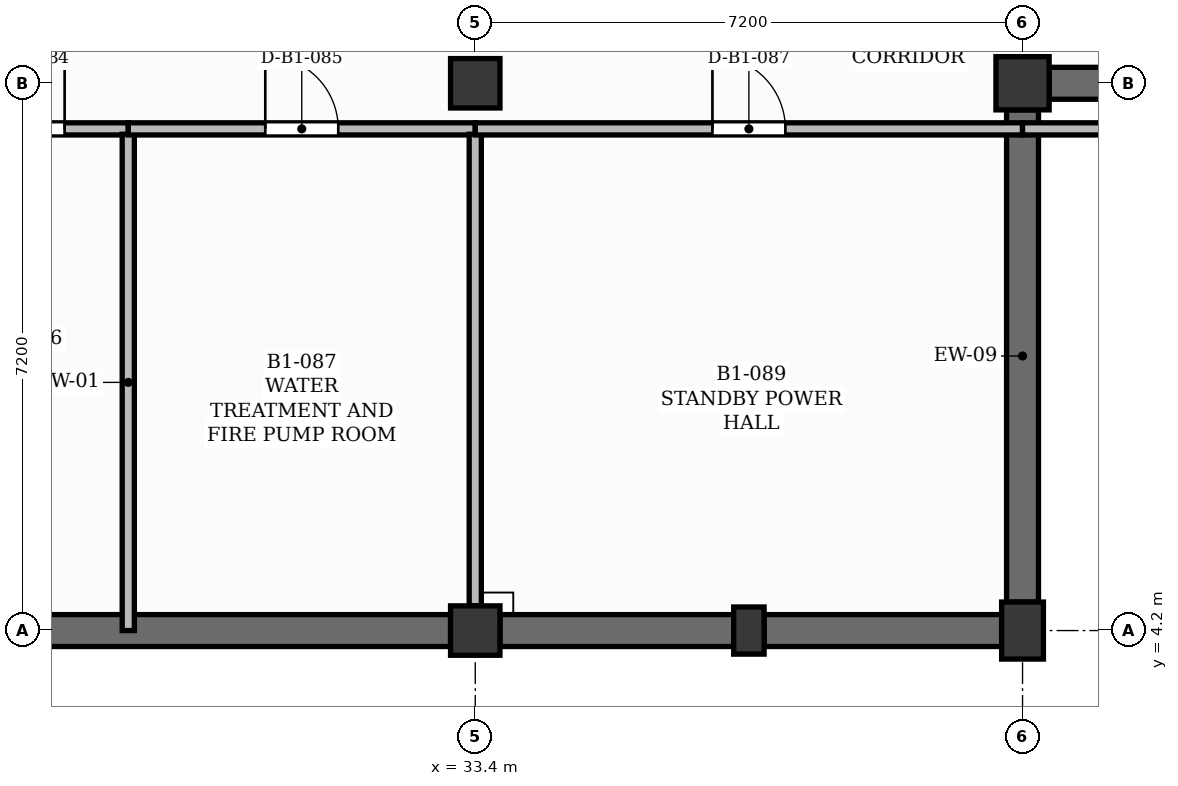
"""IFC4 building model, lengths in metres.
Left out: names, types, materials, properties, quantities, classifications, styles, units other than length and angle.
Written with IfcOpenShell. Run it as: python <this file> out.ifc"""

import sys

from ifc_helpers import new_model, si_unit, direction, frame, frame_2d, origin, origin_2d, place, context, subcontext, project, spatial, rectangle, extrude, element, fill, save


model = new_model("IFC4")
c1 = context("Model", 3, precision=1e-05, world=origin(), true_north=direction((0.0, 1.0)))
c2 = subcontext(c1, "Body", "Model", "MODEL_VIEW")
j1 = project(units=[si_unit("LENGTHUNIT", "METRE"), si_unit("PLANEANGLEUNIT", "RADIAN")], contexts=[c1])
p1 = place(None, origin())
s1 = spatial("IfcSite", under=j1, at=p1, CompositionType="ELEMENT")
p2 = place(p1, origin())
s2 = spatial("IfcBuilding", under=s1, at=p2, CompositionType="ELEMENT")
p3 = place(p2, frame((0.0, 0.0, -4.5)))
s3 = spatial("IfcBuildingStorey", under=s2, at=p3, CompositionType="ELEMENT", Elevation=-4.5)
for number, where, z_axis, x_axis in (
    (1, (33.4, 4.2, 0.0), (0.0, 0.0, 1.0), (1.0, 0.0, 0.0)),
    (2, (33.4, 11.4, 0.0), (0.0, 0.0, 1.0), (1.0, 0.0, 0.0)),
):
    element("IfcColumn", number, at=place(p3, frame(where, z_axis=z_axis, x_axis=x_axis)), inside=s3, PredefinedType="COLUMN", context=c2, shape_type="SweptSolid", body=[
        extrude(rectangle(XDim=0.65, YDim=0.65, at=origin_2d()), origin(), (0.0, 0.0, 1.0), 4.2),
    ])
p4 = place(p3, frame((40.6, 4.2, 0.0), z_axis=(0.0, 0.0, 1.0), x_axis=(1.0, 0.0, 0.0)))
e3 = element("IfcColumn", 3, at=p4, inside=s3, PredefinedType="COLUMN", context=c2, shape_type="SweptSolid", body=[
    extrude(rectangle(XDim=0.55, YDim=0.75, at=origin_2d()), origin(), (0.0, 0.0, 1.0), 4.2),
])
p5 = place(p3, frame((40.6, 11.4, 0.0), z_axis=(0.0, 0.0, 1.0), x_axis=(1.0, 0.0, 0.0)))
e4 = element("IfcColumn", 4, at=p5, inside=s3, PredefinedType="COLUMN", context=c2, shape_type="SweptSolid", body=[
    extrude(rectangle(XDim=0.7, YDim=0.7, at=origin_2d()), origin(), (0.0, 0.0, 1.0), 4.2),
])
p6 = place(p3, frame((37.0, 4.2, 0.0), z_axis=(0.0, 0.0, 1.0), x_axis=(1.0, 0.0, 0.0)))
e5 = element("IfcColumn", 5, at=p6, inside=s3, PredefinedType="PILASTER", context=c2, shape_type="SweptSolid", body=[
    extrude(rectangle(XDim=0.4, YDim=0.62, at=origin_2d()), origin(), (0.0, 0.0, 1.0), 4.2),
])
p7 = place(p3, frame((26.55, 4.2, 0.0), z_axis=(0.0, 0.0, 1.0), x_axis=(1.0, 0.0, 0.0)))
e6 = element("IfcWall", 6, at=p7, inside=s3, PredefinedType="USERDEFINED", context=c2, shape_type="SweptSolid", body=[
    extrude(rectangle(XDim=6.525, YDim=0.42, at=frame_2d((3.262, 0.0))), origin(), (0.0, 0.0, 1.0), 4.2),
])
p8 = place(p3, frame((33.725, 4.2, 0.0), z_axis=(0.0, 0.0, 1.0), x_axis=(1.0, 0.0, 0.0)))
e7 = element("IfcWall", 7, at=p8, inside=s3, PredefinedType="USERDEFINED", context=c2, shape_type="SweptSolid", body=[
    extrude(rectangle(XDim=3.075, YDim=0.42, at=frame_2d((1.538, 0.0))), origin(), (0.0, 0.0, 1.0), 4.2),
])
p9 = place(p3, frame((37.2, 4.2, 0.0), z_axis=(0.0, 0.0, 1.0), x_axis=(1.0, 0.0, 0.0)))
e8 = element("IfcWall", 8, at=p9, inside=s3, PredefinedType="USERDEFINED", context=c2, shape_type="SweptSolid", body=[
    extrude(rectangle(XDim=3.125, YDim=0.42, at=frame_2d((1.562, 0.0))), origin(), (0.0, 0.0, 1.0), 4.2),
])
p10 = place(p3, frame((40.6, 4.575, 0.0), z_axis=(0.0, 0.0, 1.0), x_axis=(0.0, 1.0, 0.0)))
e9 = element("IfcWall", 9, at=p10, inside=s3, PredefinedType="USERDEFINED", context=c2, shape_type="SweptSolid", body=[
    extrude(rectangle(XDim=6.475, YDim=0.42, at=frame_2d((3.238, 0.0))), origin(), (0.0, 0.0, 1.0), 4.2),
])
p11 = place(p3, frame((40.95, 11.4, 0.0), z_axis=(0.0, 0.0, 1.0), x_axis=(1.0, 0.0, 0.0)))
e10 = element("IfcWall", 10, at=p11, inside=s3, PredefinedType="USERDEFINED", context=c2, shape_type="SweptSolid", body=[
    extrude(rectangle(XDim=6.525, YDim=0.42, at=frame_2d((3.263, 0.0))), origin(), (0.0, 0.0, 1.0), 4.2),
])
p12 = place(p3, frame((26.2, 10.8, 0.0), z_axis=(0.0, 0.0, 1.0), x_axis=(1.0, 0.0, 0.0)))
e11 = element("IfcWall", 11, at=p12, inside=s3, PredefinedType="PARTITIONING", context=c2, shape_type="SweptSolid", body=[
    extrude(rectangle(XDim=2.635, YDim=0.16, at=frame_2d((1.317, 0.0))), origin(), (0.0, 0.0, 1.0), 4.08),
])
p13 = place(p12, frame((0.837, 0.0, 0.0)))
e12 = element("IfcOpeningElement", 12, at=p13, cuts=e11, PredefinedType="OPENING", context=c2, shape_type="SweptSolid", body=[
    extrude(rectangle(XDim=0.96, YDim=2.1, at=frame_2d((0.48, 1.05))), frame((0.0, 0.09, 0.0), z_axis=(0.0, -1.0, 0.0), x_axis=(1.0, 0.0, 0.0)), (0.0, 0.0, 1.0), 0.18),
])
p14 = place(p3, frame((28.835, 4.2, 0.0), z_axis=(0.0, 0.0, 1.0), x_axis=(0.0, 1.0, 0.0)))
e13 = element("IfcWall", 13, at=p14, inside=s3, PredefinedType="PARTITIONING", context=c2, shape_type="SweptSolid", body=[
    extrude(rectangle(XDim=6.53, YDim=0.16, at=frame_2d((3.265, 0.0))), origin(), (0.0, 0.0, 1.0), 4.08),
])
p15 = place(p3, frame((28.835, 10.8, 0.0), z_axis=(0.0, 0.0, 1.0), x_axis=(1.0, 0.0, 0.0)))
e14 = element("IfcWall", 14, at=p15, inside=s3, PredefinedType="PARTITIONING", context=c2, shape_type="SweptSolid", body=[
    extrude(rectangle(XDim=4.565, YDim=0.16, at=frame_2d((2.282, 0.0))), origin(), (0.0, 0.0, 1.0), 4.08),
])
p16 = place(p15, frame((1.802, 0.0, 0.0)))
e15 = element("IfcOpeningElement", 15, at=p16, cuts=e14, PredefinedType="OPENING", context=c2, shape_type="SweptSolid", body=[
    extrude(rectangle(XDim=0.96, YDim=2.1, at=frame_2d((0.48, 1.05))), frame((0.0, 0.09, 0.0), z_axis=(0.0, -1.0, 0.0), x_axis=(1.0, 0.0, 0.0)), (0.0, 0.0, 1.0), 0.18),
])
p17 = place(p3, frame((33.4, 4.525, 0.0), z_axis=(0.0, 0.0, 1.0), x_axis=(0.0, 1.0, 0.0)))
e16 = element("IfcWall", 16, at=p17, inside=s3, PredefinedType="PARTITIONING", context=c2, shape_type="SweptSolid", body=[
    extrude(rectangle(XDim=6.205, YDim=0.16, at=frame_2d((3.103, 0.0))), origin(), (0.0, 0.0, 1.0), 3.5),
])
p18 = place(p3, frame((33.4, 10.8, 0.0), z_axis=(0.0, 0.0, 1.0), x_axis=(1.0, 0.0, 0.0)))
e17 = element("IfcWall", 17, at=p18, inside=s3, PredefinedType="PARTITIONING", context=c2, shape_type="SweptSolid", body=[
    extrude(rectangle(XDim=7.2, YDim=0.16, at=frame_2d((3.6, 0.0))), origin(), (0.0, 0.0, 1.0), 4.08),
])
p19 = place(p18, frame((3.12, 0.0, 0.0)))
e18 = element("IfcOpeningElement", 18, at=p19, cuts=e17, PredefinedType="OPENING", context=c2, shape_type="SweptSolid", body=[
    extrude(rectangle(XDim=0.96, YDim=2.1, at=frame_2d((0.48, 1.05))), frame((0.0, 0.09, 0.0), z_axis=(0.0, -1.0, 0.0), x_axis=(1.0, 0.0, 0.0)), (0.0, 0.0, 1.0), 0.18),
])
p20 = place(p3, frame((40.6, 10.8, 0.0), z_axis=(0.0, 0.0, 1.0), x_axis=(1.0, 0.0, 0.0)))
e19 = element("IfcWall", 19, at=p20, inside=s3, PredefinedType="PARTITIONING", context=c2, shape_type="SweptSolid", body=[
    extrude(rectangle(XDim=7.2, YDim=0.16, at=frame_2d((3.6, 0.0))), origin(), (0.0, 0.0, 1.0), 4.08),
])
p21 = place(p13, origin())
e20 = element("IfcDoor", 20, at=p21, inside=s3, OperationType="SINGLE_SWING_RIGHT", PredefinedType="DOOR", context=c2, shape_type="SweptSolid", body=[
    extrude(rectangle(XDim=0.96, YDim=2.1, at=frame_2d((0.48, 1.05))), frame((0.0, 0.025, 0.0), z_axis=(0.0, -1.0, 0.0), x_axis=(1.0, 0.0, 0.0)), (0.0, 0.0, 1.0), 0.05),
])
fill(e12, e20)
p22 = place(p16, origin())
e21 = element("IfcDoor", 21, at=p22, inside=s3, OperationType="SINGLE_SWING_LEFT", PredefinedType="DOOR", context=c2, shape_type="SweptSolid", body=[
    extrude(rectangle(XDim=0.96, YDim=2.1, at=frame_2d((0.48, 1.05))), frame((0.0, 0.025, 0.0), z_axis=(0.0, -1.0, 0.0), x_axis=(1.0, 0.0, 0.0)), (0.0, 0.0, 1.0), 0.05),
])
fill(e15, e21)
p23 = place(p19, origin())
e22 = element("IfcDoor", 22, at=p23, inside=s3, OperationType="SINGLE_SWING_LEFT", PredefinedType="DOOR", context=c2, shape_type="SweptSolid", body=[
    extrude(rectangle(XDim=0.96, YDim=2.1, at=frame_2d((0.48, 1.05))), frame((0.0, 0.025, 0.0), z_axis=(0.0, -1.0, 0.0), x_axis=(1.0, 0.0, 0.0)), (0.0, 0.0, 1.0), 0.05),
])
fill(e18, e22)
save(model, sys.argv[1])
